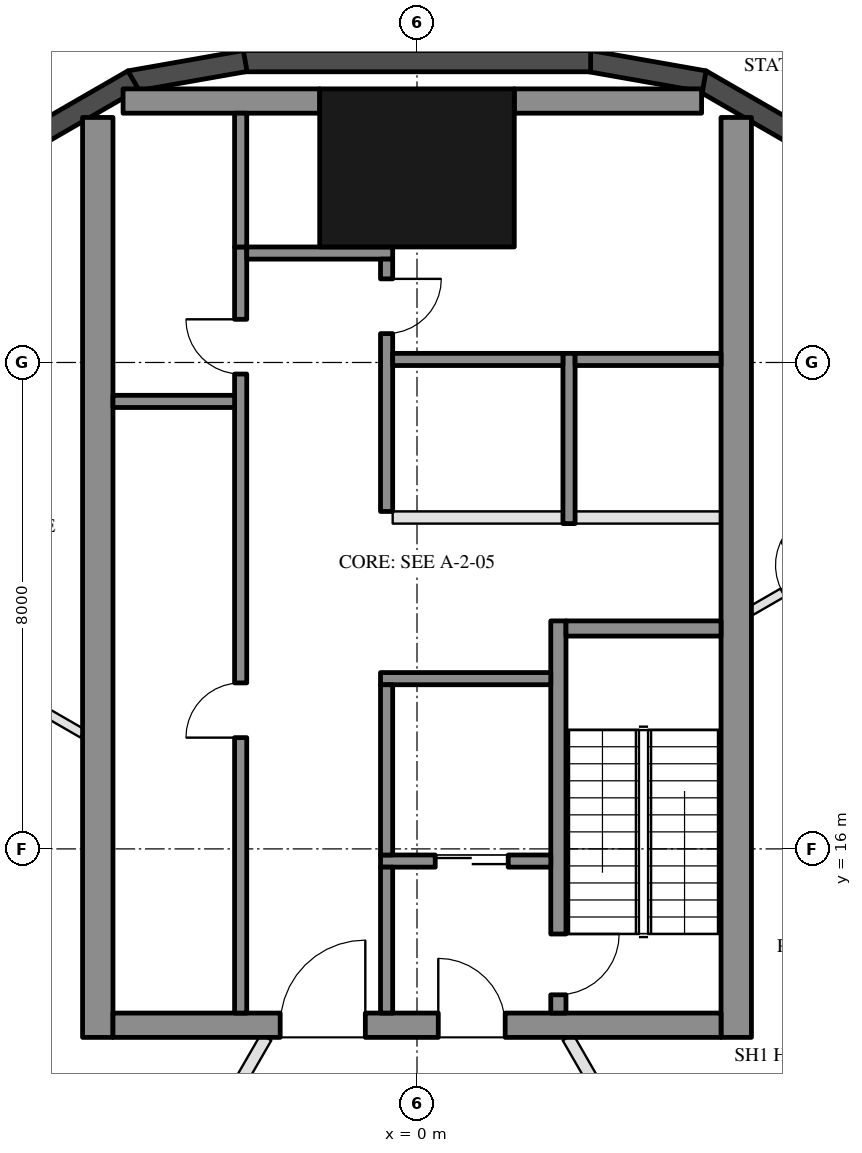
"""IFC4 building model, lengths in metres.
Left out: names, types, materials, properties, quantities, classifications, styles, units other than length and angle.
Written with IfcOpenShell. Run it as: python <this file> out.ifc"""

import sys

from ifc_helpers import new_model, si_unit, direction, frame, frame_2d, origin, origin_2d, place, context, subcontext, project, spatial, rectangle, hollow_rectangle, extrude, element, fill, save


model = new_model("IFC4")
c1 = context("Model", 3, precision=1e-05, world=origin(), true_north=direction((0.0, 1.0)))
c2 = subcontext(c1, "Body", "Model", "MODEL_VIEW")
j1 = project(units=[si_unit("LENGTHUNIT", "METRE"), si_unit("PLANEANGLEUNIT", "RADIAN")], contexts=[c1])
p1 = place(None, origin())
s1 = spatial("IfcSite", under=j1, at=p1, CompositionType="ELEMENT")
p2 = place(p1, origin())
s2 = spatial("IfcBuilding", under=s1, at=p2, CompositionType="ELEMENT")
p3 = place(p2, frame((0.0, 0.0, 28.5)))
s3 = spatial("IfcBuildingStorey", under=s2, at=p3, CompositionType="ELEMENT", Elevation=28.5)
p4 = place(p3, frame((0.0, 27.2, 0.0), z_axis=(0.0, 0.0, 1.0), x_axis=(1.0, 0.0, 0.0)))
e1 = element("IfcColumn", 1, at=p4, inside=s3, PredefinedType="COLUMN", context=c2, shape_type="SweptSolid", body=[
    extrude(hollow_rectangle(XDim=3.2, YDim=2.6, WallThickness=0.08, at=origin_2d()), origin(), (0.0, 0.0, 1.0), 4.5),
])
p5 = place(p3, frame((6.337, 27.681, 0.0), z_axis=(0.0, 0.0, 1.0), x_axis=(-0.866052736899, 0.499952654668, 0.0)))
e2 = element("IfcWall", 2, at=p5, inside=s3, PredefinedType="SOLIDWALL", context=c2, shape_type="SweptSolid", body=[
    extrude(rectangle(XDim=1.928, YDim=0.35, at=frame_2d((0.964, 0.0))), origin(), (0.0, 0.0, 1.0), 4.2),
])
p6 = place(p3, frame((4.724, 28.624, 0.0), z_axis=(0.0, 0.0, 1.0), x_axis=(-0.98481795522, 0.173590308126, 0.0)))
e3 = element("IfcWall", 3, at=p6, inside=s3, PredefinedType="SOLIDWALL", context=c2, shape_type="SweptSolid", body=[
    extrude(rectangle(XDim=1.928, YDim=0.35, at=frame_2d((0.964, 0.0))), origin(), (0.0, 0.0, 1.0), 4.2),
])
p7 = place(p3, frame((2.856, 28.956, 0.0), z_axis=(0.0, 0.0, 1.0), x_axis=(-1.0, 0.0, 0.0)))
e4 = element("IfcWall", 4, at=p7, inside=s3, PredefinedType="SOLIDWALL", context=c2, shape_type="SweptSolid", body=[
    extrude(rectangle(XDim=5.711, YDim=0.35, at=frame_2d((2.856, 0.0))), origin(), (0.0, 0.0, 1.0), 4.2),
])
p8 = place(p3, frame((-2.825, 28.958, 0.0), z_axis=(0.0, 0.0, 1.0), x_axis=(-0.98481795522, -0.173590308126, 0.0)))
e5 = element("IfcWall", 5, at=p8, inside=s3, PredefinedType="SOLIDWALL", context=c2, shape_type="SweptSolid", body=[
    extrude(rectangle(XDim=1.928, YDim=0.35, at=frame_2d((0.964, 0.0))), origin(), (0.0, 0.0, 1.0), 4.2),
])
p9 = place(p3, frame((-4.667, 28.645, 0.0), z_axis=(0.0, 0.0, 1.0), x_axis=(-0.866052736899, -0.499952654668, 0.0)))
e6 = element("IfcWall", 6, at=p9, inside=s3, PredefinedType="SOLIDWALL", context=c2, shape_type="SweptSolid", body=[
    extrude(rectangle(XDim=1.928, YDim=0.35, at=frame_2d((0.964, 0.0))), origin(), (0.0, 0.0, 1.0), 4.2),
])
for number, where, z_axis, x_axis in (
    (7, (5.25, 12.9, 0.0), (0.0, 0.0, 1.0), (0.0, 1.0, 0.0)),
    (8, (-5.25, 12.9, 0.0), (0.0, 0.0, 1.0), (0.0, 1.0, 0.0)),
):
    element("IfcWall", number, at=place(p3, frame(where, z_axis=z_axis, x_axis=x_axis)), inside=s3, PredefinedType="SHEAR", context=c2, shape_type="SweptSolid", body=[
        extrude(rectangle(XDim=15.13, YDim=0.5, at=frame_2d((7.565, 0.0))), origin(), (0.0, 0.0, 1.0), 4.2),
    ])
p10 = place(p3, frame((5.0, 13.1, 0.0), z_axis=(0.0, 0.0, 1.0), x_axis=(-1.0, 0.0, 0.0)))
e9 = element("IfcWall", 9, at=p10, inside=s3, PredefinedType="SHEAR", context=c2, shape_type="SweptSolid", body=[
    extrude(rectangle(XDim=10.0, YDim=0.4, at=frame_2d((5.0, 0.0))), origin(), (0.0, 0.0, 1.0), 4.2),
])
p11 = place(p10, frame((3.55, 0.0, 0.0)))
e10 = element("IfcOpeningElement", 10, at=p11, cuts=e9, PredefinedType="OPENING", context=c2, shape_type="SweptSolid", body=[
    extrude(rectangle(XDim=1.1, YDim=2.1, at=frame_2d((0.55, 1.05))), frame((0.0, 0.21, 0.0), z_axis=(0.0, -1.0, 0.0), x_axis=(1.0, 0.0, 0.0)), (0.0, 0.0, 1.0), 0.42),
])
p12 = place(p10, frame((5.85, 0.0, 0.0)))
e11 = element("IfcOpeningElement", 11, at=p12, cuts=e9, PredefinedType="OPENING", context=c2, shape_type="SweptSolid", body=[
    extrude(rectangle(XDim=1.4, YDim=2.1, at=frame_2d((0.7, 1.05))), frame((0.0, 0.21, 0.0), z_axis=(0.0, -1.0, 0.0), x_axis=(1.0, 0.0, 0.0)), (0.0, 0.0, 1.0), 0.42),
])
p13 = place(p3, frame((-1.6, 28.3, 0.0), z_axis=(0.0, 0.0, 1.0), x_axis=(-1.0, 0.0, 0.0)))
e12 = element("IfcWall", 12, at=p13, inside=s3, PredefinedType="SHEAR", context=c2, shape_type="SweptSolid", body=[
    extrude(rectangle(XDim=3.234, YDim=0.4, at=frame_2d((1.617, 0.0))), origin(), (0.0, 0.0, 1.0), 4.2),
])
p14 = place(p3, frame((4.68, 28.3, 0.0), z_axis=(0.0, 0.0, 1.0), x_axis=(-1.0, 0.0, 0.0)))
e13 = element("IfcWall", 13, at=p14, inside=s3, PredefinedType="SHEAR", context=c2, shape_type="SweptSolid", body=[
    extrude(rectangle(XDim=3.08, YDim=0.4, at=frame_2d((1.54, 0.0))), origin(), (0.0, 0.0, 1.0), 4.2),
])
p15 = place(p3, frame((2.325, 13.3, 0.0), z_axis=(0.0, 0.0, 1.0), x_axis=(0.0, 1.0, 0.0)))
e14 = element("IfcWall", 14, at=p15, inside=s3, PredefinedType="SHEAR", context=c2, shape_type="SweptSolid", body=[
    extrude(rectangle(XDim=6.45, YDim=0.25, at=frame_2d((3.225, 0.0))), origin(), (0.0, 0.0, 1.0), 4.2),
])
p16 = place(p15, frame((0.3, 0.0, 0.0)))
e15 = element("IfcOpeningElement", 15, at=p16, cuts=e14, PredefinedType="OPENING", context=c2, shape_type="SweptSolid", body=[
    extrude(rectangle(XDim=1.0, YDim=2.1, at=frame_2d((0.5, 1.05))), frame((0.0, 0.135, 0.0), z_axis=(0.0, -1.0, 0.0), x_axis=(1.0, 0.0, 0.0)), (0.0, 0.0, 1.0), 0.27),
])
p17 = place(p3, frame((5.0, 19.625, 0.0), z_axis=(0.0, 0.0, 1.0), x_axis=(-1.0, 0.0, 0.0)))
e16 = element("IfcWall", 16, at=p17, inside=s3, PredefinedType="SHEAR", context=c2, shape_type="SweptSolid", body=[
    extrude(rectangle(XDim=2.55, YDim=0.25, at=frame_2d((1.275, 0.0))), origin(), (0.0, 0.0, 1.0), 4.2),
])
p18 = place(p3, frame((2.2, 18.8, 0.0), z_axis=(0.0, 0.0, 1.0), x_axis=(-1.0, 0.0, 0.0)))
e17 = element("IfcWall", 17, at=p18, inside=s3, PredefinedType="SHEAR", context=c2, shape_type="SweptSolid", body=[
    extrude(rectangle(XDim=2.8, YDim=0.2, at=frame_2d((1.4, 0.0))), origin(), (0.0, 0.0, 1.0), 4.2),
])
p19 = place(p3, frame((2.2, 15.8, 0.0), z_axis=(0.0, 0.0, 1.0), x_axis=(-1.0, 0.0, 0.0)))
e18 = element("IfcWall", 18, at=p19, inside=s3, PredefinedType="SHEAR", context=c2, shape_type="SweptSolid", body=[
    extrude(rectangle(XDim=2.8, YDim=0.2, at=frame_2d((1.4, 0.0))), origin(), (0.0, 0.0, 1.0), 4.2),
])
p20 = place(p19, frame((0.7, 0.0, 0.0)))
e19 = element("IfcOpeningElement", 19, at=p20, cuts=e18, PredefinedType="OPENING", context=c2, shape_type="SweptSolid", body=[
    extrude(rectangle(XDim=1.2, YDim=2.1, at=frame_2d((0.6, 1.05))), frame((0.0, 0.11, 0.0), z_axis=(0.0, -1.0, 0.0), x_axis=(1.0, 0.0, 0.0)), (0.0, 0.0, 1.0), 0.22),
])
p21 = place(p3, frame((-0.5, 15.9, 0.0), z_axis=(0.0, 0.0, 1.0), x_axis=(0.0, 1.0, 0.0)))
e20 = element("IfcWall", 20, at=p21, inside=s3, PredefinedType="SHEAR", context=c2, shape_type="SweptSolid", body=[
    extrude(rectangle(XDim=2.8, YDim=0.2, at=frame_2d((1.4, 0.0))), origin(), (0.0, 0.0, 1.0), 4.2),
])
p22 = place(p3, frame((-0.5, 13.3, 0.0), z_axis=(0.0, 0.0, 1.0), x_axis=(0.0, 1.0, 0.0)))
e21 = element("IfcWall", 21, at=p22, inside=s3, PredefinedType="SHEAR", context=c2, shape_type="SweptSolid", body=[
    extrude(rectangle(XDim=2.4, YDim=0.2, at=frame_2d((1.2, 0.0))), origin(), (0.0, 0.0, 1.0), 4.2),
])
p23 = place(p3, frame((-2.9, 13.3, 0.0), z_axis=(0.0, 0.0, 1.0), x_axis=(0.0, 1.0, 0.0)))
e22 = element("IfcWall", 22, at=p23, inside=s3, PredefinedType="SHEAR", context=c2, shape_type="SweptSolid", body=[
    extrude(rectangle(XDim=12.6, YDim=0.2, at=frame_2d((6.3, 0.0))), origin(), (0.0, 0.0, 1.0), 4.2),
])
p24 = place(p23, frame((4.53, 0.0, 0.0)))
e23 = element("IfcOpeningElement", 23, at=p24, cuts=e22, PredefinedType="OPENING", context=c2, shape_type="SweptSolid", body=[
    extrude(rectangle(XDim=0.9, YDim=2.1, at=frame_2d((0.45, 1.05))), frame((0.0, 0.11, 0.0), z_axis=(0.0, -1.0, 0.0), x_axis=(1.0, 0.0, 0.0)), (0.0, 0.0, 1.0), 0.22),
])
p25 = place(p23, frame((10.51, 0.0, 0.0)))
e24 = element("IfcOpeningElement", 24, at=p25, cuts=e22, PredefinedType="OPENING", context=c2, shape_type="SweptSolid", body=[
    extrude(rectangle(XDim=0.9, YDim=2.1, at=frame_2d((0.45, 1.05))), frame((0.0, 0.11, 0.0), z_axis=(0.0, -1.0, 0.0), x_axis=(1.0, 0.0, 0.0)), (0.0, 0.0, 1.0), 0.22),
])
p26 = place(p3, frame((-0.4, 25.8, 0.0), z_axis=(0.0, 0.0, 1.0), x_axis=(-1.0, 0.0, 0.0)))
e25 = element("IfcWall", 25, at=p26, inside=s3, PredefinedType="SHEAR", context=c2, shape_type="SweptSolid", body=[
    extrude(rectangle(XDim=2.4, YDim=0.2, at=frame_2d((1.2, 0.0))), origin(), (0.0, 0.0, 1.0), 4.2),
])
p27 = place(p3, frame((-0.5, 21.55, 0.0), z_axis=(0.0, 0.0, 1.0), x_axis=(0.0, 1.0, 0.0)))
e26 = element("IfcWall", 26, at=p27, inside=s3, PredefinedType="SHEAR", context=c2, shape_type="SweptSolid", body=[
    extrude(rectangle(XDim=4.15, YDim=0.2, at=frame_2d((2.075, 0.0))), origin(), (0.0, 0.0, 1.0), 4.2),
])
p28 = place(p27, frame((2.925, 0.0, 0.0)))
e27 = element("IfcOpeningElement", 27, at=p28, cuts=e26, PredefinedType="OPENING", context=c2, shape_type="SweptSolid", body=[
    extrude(rectangle(XDim=0.9, YDim=2.1, at=frame_2d((0.45, 1.05))), frame((0.0, 0.11, 0.0), z_axis=(0.0, -1.0, 0.0), x_axis=(1.0, 0.0, 0.0)), (0.0, 0.0, 1.0), 0.22),
])
p29 = place(p3, frame((-3.0, 23.36, 0.0), z_axis=(0.0, 0.0, 1.0), x_axis=(-1.0, 0.0, 0.0)))
e28 = element("IfcWall", 28, at=p29, inside=s3, PredefinedType="SHEAR", context=c2, shape_type="SweptSolid", body=[
    extrude(rectangle(XDim=2.0, YDim=0.2, at=frame_2d((1.0, 0.0))), origin(), (0.0, 0.0, 1.0), 4.2),
])
p30 = place(p3, frame((-2.9, 25.9, 0.0), z_axis=(0.0, 0.0, 1.0), x_axis=(0.0, 1.0, 0.0)))
e29 = element("IfcWall", 29, at=p30, inside=s3, PredefinedType="SHEAR", context=c2, shape_type="SweptSolid", body=[
    extrude(rectangle(XDim=2.2, YDim=0.2, at=frame_2d((1.1, 0.0))), origin(), (0.0, 0.0, 1.0), 4.2),
])
p31 = place(p3, frame((2.5, 21.35, 0.0), z_axis=(0.0, 0.0, 1.0), x_axis=(0.0, 1.0, 0.0)))
e30 = element("IfcWall", 30, at=p31, inside=s3, PredefinedType="SHEAR", context=c2, shape_type="SweptSolid", body=[
    extrude(rectangle(XDim=2.8, YDim=0.2, at=frame_2d((1.4, 0.0))), origin(), (0.0, 0.0, 1.0), 4.2),
])
p32 = place(p3, frame((5.0, 24.05, 0.0), z_axis=(0.0, 0.0, 1.0), x_axis=(-1.0, 0.0, 0.0)))
e31 = element("IfcWall", 31, at=p32, inside=s3, PredefinedType="SHEAR", context=c2, shape_type="SweptSolid", body=[
    extrude(rectangle(XDim=2.4, YDim=0.2, at=frame_2d((1.2, 0.0))), origin(), (0.0, 0.0, 1.0), 4.2),
])
p33 = place(p3, frame((2.4, 24.05, 0.0), z_axis=(0.0, 0.0, 1.0), x_axis=(-1.0, 0.0, 0.0)))
e32 = element("IfcWall", 32, at=p33, inside=s3, PredefinedType="SHEAR", context=c2, shape_type="SweptSolid", body=[
    extrude(rectangle(XDim=2.8, YDim=0.2, at=frame_2d((1.4, 0.0))), origin(), (0.0, 0.0, 1.0), 4.2),
])
p34 = place(p3, frame((5.0, 21.45, 0.0), z_axis=(0.0, 0.0, 1.0), x_axis=(-1.0, 0.0, 0.0)))
e33 = element("IfcWall", 33, at=p34, inside=s3, PredefinedType="PARTITIONING", context=c2, shape_type="SweptSolid", body=[
    extrude(rectangle(XDim=2.4, YDim=0.2, at=frame_2d((1.2, 0.0))), origin(), (0.0, 0.0, 1.0), 4.2),
])
p35 = place(p3, frame((2.4, 21.45, 0.0), z_axis=(0.0, 0.0, 1.0), x_axis=(-1.0, 0.0, 0.0)))
e34 = element("IfcWall", 34, at=p35, inside=s3, PredefinedType="PARTITIONING", context=c2, shape_type="SweptSolid", body=[
    extrude(rectangle(XDim=2.8, YDim=0.2, at=frame_2d((1.4, 0.0))), origin(), (0.0, 0.0, 1.0), 4.2),
])
p36 = place(p3, frame((13.748, 15.328, 0.0), z_axis=(0.0, 0.0, 1.0), x_axis=(-0.86602026553, -0.500008899612, 0.0)))
e35 = element("IfcWall", 35, at=p36, inside=s3, PredefinedType="SOLIDWALL", context=c2, shape_type="SweptSolid", body=[
    extrude(rectangle(XDim=10.87, YDim=0.2, at=frame_2d((5.435, 0.0))), origin(), (0.0, 0.0, 1.0), 4.2),
])
p37 = place(p3, frame((9.737, 22.365, 0.0), z_axis=(0.0, 0.0, 1.0), x_axis=(-0.866020200517, -0.500009012216, 0.0)))
e36 = element("IfcWall", 36, at=p37, inside=s3, PredefinedType="PARTITIONING", context=c2, shape_type="SweptSolid", body=[
    extrude(rectangle(XDim=4.892, YDim=0.15, at=frame_2d((2.446, 0.0))), origin(), (0.0, 0.0, 1.0), 3.6),
])
p38 = place(p37, frame((3.396, 0.0, 0.0)))
e37 = element("IfcOpeningElement", 37, at=p38, cuts=e36, PredefinedType="OPENING", context=c2, shape_type="SweptSolid", body=[
    extrude(rectangle(XDim=0.9, YDim=2.1, at=frame_2d((0.45, 1.05))), frame((0.0, 0.085, 0.0), z_axis=(0.0, -1.0, 0.0), x_axis=(1.0, 0.0, 0.0)), (0.0, 0.0, 1.0), 0.17),
])
p39 = place(p3, frame((12.413, -4.3, 0.0), z_axis=(0.0, 0.0, 1.0), x_axis=(-0.50000478328, 0.866022642139, 0.0)))
e38 = element("IfcWall", 38, at=p39, inside=s3, PredefinedType="PARTITIONING", context=c2, shape_type="SweptSolid", body=[
    extrude(rectangle(XDim=19.861, YDim=0.2, at=frame_2d((9.931, 0.0))), origin(), (0.0, 0.0, 1.0), 3.41),
])
p40 = place(p39, frame((1.134, 0.0, 0.0)))
e39 = element("IfcOpeningElement", 39, at=p40, cuts=e38, PredefinedType="OPENING", context=c2, shape_type="SweptSolid", body=[
    extrude(rectangle(XDim=1.2, YDim=2.1, at=frame_2d((0.6, 1.05))), frame((0.0, 0.11, 0.0), z_axis=(0.0, -1.0, 0.0), x_axis=(1.0, 0.0, 0.0)), (0.0, 0.0, 1.0), 0.22),
])
p41 = place(p39, frame((16.89, 0.0, 0.0)))
e40 = element("IfcOpeningElement", 40, at=p41, cuts=e38, PredefinedType="OPENING", context=c2, shape_type="SweptSolid", body=[
    extrude(rectangle(XDim=1.8, YDim=2.4, at=frame_2d((0.9, 1.2))), frame((0.0, 0.11, 0.0), z_axis=(0.0, -1.0, 0.0), x_axis=(1.0, 0.0, 0.0)), (0.0, 0.0, 1.0), 0.22),
])
p42 = place(p39, frame((13.23, 0.0, 0.0)))
e41 = element("IfcOpeningElement", 41, at=p42, cuts=e38, PredefinedType="OPENING", context=c2, shape_type="SweptSolid", body=[
    extrude(rectangle(XDim=1.8, YDim=2.1, at=frame_2d((0.9, 1.05))), frame((0.0, 0.11, 0.0), z_axis=(0.0, -1.0, 0.0), x_axis=(1.0, 0.0, 0.0)), (0.0, 0.0, 1.0), 0.22),
])
p43 = place(p39, frame((7.168, 0.0, 0.0)))
e42 = element("IfcOpeningElement", 42, at=p43, cuts=e38, PredefinedType="OPENING", context=c2, shape_type="SweptSolid", body=[
    extrude(rectangle(XDim=1.0, YDim=2.1, at=frame_2d((0.5, 1.05))), frame((0.0, 0.11, 0.0), z_axis=(0.0, -1.0, 0.0), x_axis=(1.0, 0.0, 0.0)), (0.0, 0.0, 1.0), 0.22),
])
p44 = place(p3, frame((-10.612, 20.849, 0.0), z_axis=(0.0, 0.0, 1.0), x_axis=(0.866007180818, -0.500031561776, 0.0)))
e43 = element("IfcWall", 43, at=p44, inside=s3, PredefinedType="PARTITIONING", context=c2, shape_type="SweptSolid", body=[
    extrude(rectangle(XDim=5.902, YDim=0.15, at=frame_2d((2.951, 0.0))), origin(), (0.0, 0.0, 1.0), 3.6),
])
p45 = place(p44, frame((2.501, 0.0, 0.0)))
e44 = element("IfcOpeningElement", 44, at=p45, cuts=e43, PredefinedType="OPENING", context=c2, shape_type="SweptSolid", body=[
    extrude(rectangle(XDim=0.9, YDim=2.1, at=frame_2d((0.45, 1.05))), frame((0.0, 0.085, 0.0), z_axis=(0.0, -1.0, 0.0), x_axis=(1.0, 0.0, 0.0)), (0.0, 0.0, 1.0), 0.17),
])
p46 = place(p3, frame((-14.237, 14.57, 0.0), z_axis=(0.0, 0.0, 1.0), x_axis=(0.866022430415, -0.500005149991, 0.0)))
e45 = element("IfcWall", 45, at=p46, inside=s3, PredefinedType="PARTITIONING", context=c2, shape_type="SweptSolid", body=[
    extrude(rectangle(XDim=10.915, YDim=0.15, at=frame_2d((5.457, 0.0))), origin(), (0.0, 0.0, 1.0), 3.6),
])
p47 = place(p3, frame((-2.482, 12.9, 0.0), z_axis=(0.0, 0.0, 1.0), x_axis=(-0.50000478328, -0.866022642139, 0.0)))
e46 = element("IfcWall", 46, at=p47, inside=s3, PredefinedType="PARTITIONING", context=c2, shape_type="SweptSolid", body=[
    extrude(rectangle(XDim=19.861, YDim=0.2, at=frame_2d((9.931, 0.0))), origin(), (0.0, 0.0, 1.0), 3.41),
])
p48 = place(p47, frame((13.23, 0.0, 0.0)))
e47 = element("IfcOpeningElement", 47, at=p48, cuts=e46, PredefinedType="OPENING", context=c2, shape_type="SweptSolid", body=[
    extrude(rectangle(XDim=1.8, YDim=2.1, at=frame_2d((0.9, 1.05))), frame((0.0, 0.11, 0.0), z_axis=(0.0, -1.0, 0.0), x_axis=(1.0, 0.0, 0.0)), (0.0, 0.0, 1.0), 0.22),
])
p49 = place(p47, frame((1.634, 0.0, 0.0)))
e48 = element("IfcOpeningElement", 48, at=p49, cuts=e46, PredefinedType="OPENING", context=c2, shape_type="SweptSolid", body=[
    extrude(rectangle(XDim=1.2, YDim=2.1, at=frame_2d((0.6, 1.05))), frame((0.0, 0.11, 0.0), z_axis=(0.0, -1.0, 0.0), x_axis=(1.0, 0.0, 0.0)), (0.0, 0.0, 1.0), 0.22),
])
p50 = place(p47, frame((6.206, 0.0, 0.0)))
e49 = element("IfcOpeningElement", 49, at=p50, cuts=e46, PredefinedType="OPENING", context=c2, shape_type="SweptSolid", body=[
    extrude(rectangle(XDim=1.0, YDim=2.1, at=frame_2d((0.5, 1.05))), frame((0.0, 0.11, 0.0), z_axis=(0.0, -1.0, 0.0), x_axis=(1.0, 0.0, 0.0)), (0.0, 0.0, 1.0), 0.22),
])
p51 = place(p47, frame((9.943, 0.0, 0.0)))
e50 = element("IfcOpeningElement", 50, at=p51, cuts=e46, PredefinedType="OPENING", context=c2, shape_type="SweptSolid", body=[
    extrude(rectangle(XDim=1.0, YDim=2.1, at=frame_2d((0.5, 1.05))), frame((0.0, 0.11, 0.0), z_axis=(0.0, -1.0, 0.0), x_axis=(1.0, 0.0, 0.0)), (0.0, 0.0, 1.0), 0.22),
])
p52 = place(p47, frame((17.59, 0.0, 0.0)))
e51 = element("IfcOpeningElement", 51, at=p52, cuts=e46, PredefinedType="OPENING", context=c2, shape_type="SweptSolid", body=[
    extrude(rectangle(XDim=1.0, YDim=2.1, at=frame_2d((0.5, 1.05))), frame((0.0, 0.11, 0.0), z_axis=(0.0, -1.0, 0.0), x_axis=(1.0, 0.0, 0.0)), (0.0, 0.0, 1.0), 0.22),
])
p53 = place(p20, origin())
e52 = element("IfcDoor", 52, at=p53, inside=s3, OperationType="DOUBLE_DOOR_SLIDING", PredefinedType="DOOR", context=c2, shape_type="SweptSolid", body=[
    extrude(rectangle(XDim=1.2, YDim=2.1, at=frame_2d((0.6, 1.05))), frame((0.0, 0.025, 0.0), z_axis=(0.0, -1.0, 0.0), x_axis=(1.0, 0.0, 0.0)), (0.0, 0.0, 1.0), 0.05),
])
fill(e19, e52)
p54 = place(p24, origin())
e53 = element("IfcDoor", 53, at=p54, inside=s3, OperationType="SINGLE_SWING_LEFT", PredefinedType="DOOR", context=c2, shape_type="SweptSolid", body=[
    extrude(rectangle(XDim=0.9, YDim=2.1, at=frame_2d((0.45, 1.05))), frame((0.0, 0.025, 0.0), z_axis=(0.0, -1.0, 0.0), x_axis=(1.0, 0.0, 0.0)), (0.0, 0.0, 1.0), 0.05),
])
fill(e23, e53)
p55 = place(p25, origin())
e54 = element("IfcDoor", 54, at=p55, inside=s3, OperationType="SINGLE_SWING_RIGHT", PredefinedType="DOOR", context=c2, shape_type="SweptSolid", body=[
    extrude(rectangle(XDim=0.9, YDim=2.1, at=frame_2d((0.45, 1.05))), frame((0.0, 0.025, 0.0), z_axis=(0.0, -1.0, 0.0), x_axis=(1.0, 0.0, 0.0)), (0.0, 0.0, 1.0), 0.05),
])
fill(e24, e54)
p56 = place(p28, frame((0.9, 0.0, 0.0), z_axis=(0.0, 0.0, 1.0), x_axis=(-1.0, 0.0, 0.0)))
e55 = element("IfcDoor", 55, at=p56, inside=s3, OperationType="SINGLE_SWING_LEFT", PredefinedType="DOOR", context=c2, shape_type="SweptSolid", body=[
    extrude(rectangle(XDim=0.9, YDim=2.1, at=frame_2d((0.45, 1.05))), frame((0.0, 0.025, 0.0), z_axis=(0.0, -1.0, 0.0), x_axis=(1.0, 0.0, 0.0)), (0.0, 0.0, 1.0), 0.05),
])
fill(e27, e55)
p57 = place(p11, frame((1.1, 0.0, 0.0), z_axis=(0.0, 0.0, 1.0), x_axis=(-1.0, 0.0, 0.0)))
e56 = element("IfcDoor", 56, at=p57, inside=s3, OperationType="SINGLE_SWING_LEFT", PredefinedType="DOOR", context=c2, shape_type="SweptSolid", body=[
    extrude(rectangle(XDim=1.1, YDim=2.1, at=frame_2d((0.55, 1.05))), frame((0.0, 0.025, 0.0), z_axis=(0.0, -1.0, 0.0), x_axis=(1.0, 0.0, 0.0)), (0.0, 0.0, 1.0), 0.05),
])
fill(e10, e56)
p58 = place(p12, frame((1.4, 0.0, 0.0), z_axis=(0.0, 0.0, 1.0), x_axis=(-1.0, 0.0, 0.0)))
e57 = element("IfcDoor", 57, at=p58, inside=s3, OperationType="DOUBLE_DOOR_SINGLE_SWING", PredefinedType="DOOR", context=c2, shape_type="SweptSolid", body=[
    extrude(rectangle(XDim=1.4, YDim=2.1, at=frame_2d((0.7, 1.05))), frame((0.0, 0.025, 0.0), z_axis=(0.0, -1.0, 0.0), x_axis=(1.0, 0.0, 0.0)), (0.0, 0.0, 1.0), 0.05),
])
fill(e11, e57)
p59 = place(p16, frame((1.0, 0.0, 0.0), z_axis=(0.0, 0.0, 1.0), x_axis=(-1.0, 0.0, 0.0)))
e58 = element("IfcDoor", 58, at=p59, inside=s3, OperationType="SINGLE_SWING_LEFT", PredefinedType="DOOR", context=c2, shape_type="SweptSolid", body=[
    extrude(rectangle(XDim=1.0, YDim=2.1, at=frame_2d((0.5, 1.05))), frame((0.0, 0.025, 0.0), z_axis=(0.0, -1.0, 0.0), x_axis=(1.0, 0.0, 0.0)), (0.0, 0.0, 1.0), 0.05),
])
fill(e15, e58)
save(model, sys.argv[1])
